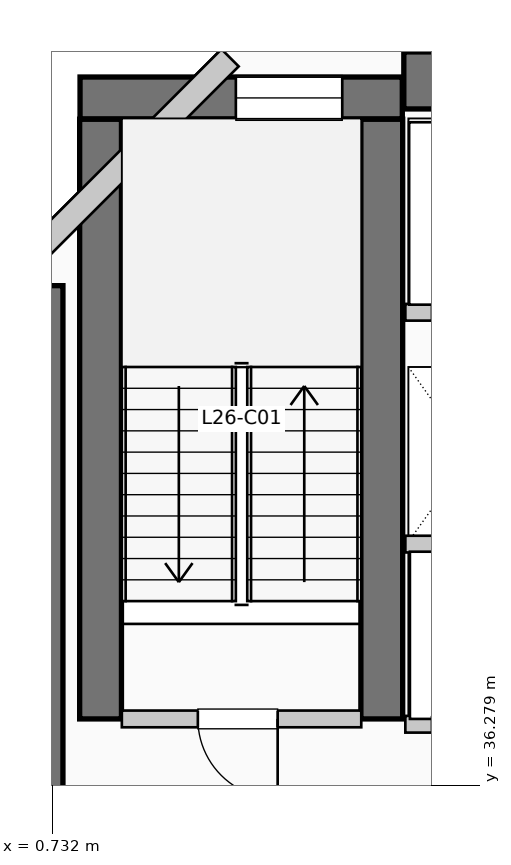
"""IFC4 building model, lengths in metres.
Left out: names, types, materials, properties, quantities, classifications, styles, units other than length and angle.
Written with IfcOpenShell. Run it as: python <this file> out.ifc"""

import sys

from ifc_helpers import new_model, si_unit, direction, frame, frame_2d, origin, place, context, subcontext, project, spatial, rectangle, extrude, element, fill, save


model = new_model("IFC4")
c1 = context("Model", 3, precision=1e-05, world=origin(), true_north=direction((0.0, 1.0)))
c2 = subcontext(c1, "Body", "Model", "MODEL_VIEW")
j1 = project(units=[si_unit("LENGTHUNIT", "METRE"), si_unit("PLANEANGLEUNIT", "RADIAN")], contexts=[c1])
p1 = place(None, origin())
s1 = spatial("IfcSite", under=j1, at=p1, CompositionType="ELEMENT")
p2 = place(p1, origin())
s2 = spatial("IfcBuilding", under=s1, at=p2, CompositionType="ELEMENT")
p3 = place(p2, frame((0.0, 0.0, 110.55)))
s3 = spatial("IfcBuildingStorey", under=s2, at=p3, CompositionType="ELEMENT", Elevation=110.55)
p4 = place(p3, frame((5.36, 45.55, 0.0), z_axis=(0.0, 0.0, 1.0), x_axis=(1.0, 0.0, 0.0)))
e1 = element("IfcWall", 1, at=p4, inside=s3, PredefinedType="SHEAR", context=c2, shape_type="SweptSolid", body=[
    extrude(rectangle(XDim=13.98, YDim=0.75, at=frame_2d((6.99, 0.0))), origin(), (0.0, 0.0, 1.0), 3.96),
])
p5 = place(p3, frame((0.5, 34.95, 0.0), z_axis=(0.0, 0.0, 1.0), x_axis=(0.0, 1.0, 0.0)))
e2 = element("IfcWall", 2, at=p5, inside=s3, PredefinedType="SHEAR", context=c2, shape_type="SweptSolid", body=[
    extrude(rectangle(XDim=7.9, YDim=0.75, at=frame_2d((3.95, 0.0))), origin(), (0.0, 0.0, 1.0), 3.96),
])
for number, where, z_axis, x_axis in (
    (3, (1.37, 37.15, 0.0), (0.0, 0.0, 1.0), (0.0, 1.0, 0.0)),
    (4, (5.07, 37.15, 0.0), (0.0, 0.0, 1.0), (0.0, 1.0, 0.0)),
):
    element("IfcWall", number, at=place(p3, frame(where, z_axis=z_axis, x_axis=x_axis)), inside=s3, PredefinedType="SHEAR", context=c2, shape_type="SweptSolid", body=[
        extrude(rectangle(XDim=7.89, YDim=0.55, at=frame_2d((3.945, 0.0))), origin(), (0.0, 0.0, 1.0), 3.96),
    ])
p6 = place(p3, frame((1.1, 45.32, 0.0), z_axis=(0.0, 0.0, 1.0), x_axis=(1.0, 0.0, 0.0)))
e5 = element("IfcWall", 5, at=p6, inside=s3, PredefinedType="SHEAR", context=c2, shape_type="SweptSolid", body=[
    extrude(rectangle(XDim=4.24, YDim=0.55, at=frame_2d((2.12, 0.0))), origin(), (0.0, 0.0, 1.0), 3.96),
])
p7 = place(p6, frame((2.05, 0.0, 1.05)))
e6 = element("IfcOpeningElement", 6, at=p7, cuts=e5, PredefinedType="OPENING", context=c2, shape_type="SweptSolid", body=[
    extrude(rectangle(XDim=1.4, YDim=1.8, at=frame_2d((0.7, 0.9))), frame((0.0, 0.285, 0.0), z_axis=(0.0, -1.0, 0.0), x_axis=(1.0, 0.0, 0.0)), (0.0, 0.0, 1.0), 0.57),
])
p8 = place(p3, frame((3.074, 45.848, 0.0), z_axis=(0.0, 0.0, 1.0), x_axis=(-0.707106781187, -0.707106781187, 0.0)))
e7 = element("IfcWall", 7, at=p8, inside=s3, PredefinedType="SOLIDWALL", context=c2, shape_type="SweptSolid", body=[
    extrude(rectangle(XDim=4.133, YDim=0.32, at=frame_2d((2.066, 0.0))), origin(), (0.0, 0.0, 1.0), 3.71),
])
p9 = place(p3, frame((1.65, 37.15, 0.0), z_axis=(0.0, 0.0, 1.0), x_axis=(1.0, 0.0, 0.0)))
e8 = element("IfcWall", 8, at=p9, inside=s3, PredefinedType="PARTITIONING", context=c2, shape_type="SweptSolid", body=[
    extrude(rectangle(XDim=3.15, YDim=0.22, at=frame_2d((1.575, 0.0))), origin(), (0.0, 0.0, 1.0), 3.71),
])
p10 = place(p9, frame((2.05, 0.0, 0.0), z_axis=(0.0, 0.0, 1.0), x_axis=(-1.0, 0.0, 0.0)))
e9 = element("IfcOpeningElement", 9, at=p10, cuts=e8, PredefinedType="OPENING", context=c2, shape_type="SweptSolid", body=[
    extrude(rectangle(XDim=1.05, YDim=2.15, at=frame_2d((0.525, 1.075))), frame((0.0, 0.12, 0.0), z_axis=(0.0, -1.0, 0.0), x_axis=(1.0, 0.0, 0.0)), (0.0, 0.0, 1.0), 0.24),
])
p11 = place(p3, frame((5.38, 37.08, 0.0), z_axis=(0.0, 0.0, 1.0), x_axis=(1.0, 0.0, 0.0)))
e10 = element("IfcWall", 10, at=p11, inside=s3, PredefinedType="PARTITIONING", context=c2, shape_type="SweptSolid", body=[
    extrude(rectangle(XDim=3.46, YDim=0.22, at=frame_2d((1.73, 0.0))), origin(), (0.0, 0.0, 1.0), 3.71),
])
p12 = place(p11, frame((1.55, 0.0, 0.0), z_axis=(0.0, 0.0, 1.0), x_axis=(-1.0, 0.0, 0.0)))
e11 = element("IfcOpeningElement", 11, at=p12, cuts=e10, PredefinedType="OPENING", context=c2, shape_type="SweptSolid", body=[
    extrude(rectangle(XDim=1.2, YDim=2.2, at=frame_2d((0.6, 1.1))), frame((0.0, 0.12, 0.0), z_axis=(0.0, -1.0, 0.0), x_axis=(1.0, 0.0, 0.0)), (0.0, 0.0, 1.0), 0.24),
])
p13 = place(p11, frame((3.22, 0.0, 0.0), z_axis=(0.0, 0.0, 1.0), x_axis=(-1.0, 0.0, 0.0)))
e12 = element("IfcOpeningElement", 12, at=p13, cuts=e10, PredefinedType="OPENING", context=c2, shape_type="SweptSolid", body=[
    extrude(rectangle(XDim=1.2, YDim=2.2, at=frame_2d((0.6, 1.1))), frame((0.0, 0.12, 0.0), z_axis=(0.0, -1.0, 0.0), x_axis=(1.0, 0.0, 0.0)), (0.0, 0.0, 1.0), 0.24),
])
p14 = place(p3, frame((5.38, 39.45, 0.0), z_axis=(0.0, 0.0, 1.0), x_axis=(1.0, 0.0, 0.0)))
e13 = element("IfcWall", 13, at=p14, inside=s3, PredefinedType="PARTITIONING", context=c2, shape_type="SweptSolid", body=[
    extrude(rectangle(XDim=3.46, YDim=0.22, at=frame_2d((1.73, 0.0))), origin(), (0.0, 0.0, 1.0), 3.71),
])
p15 = place(p3, frame((5.38, 42.5, 0.0), z_axis=(0.0, 0.0, 1.0), x_axis=(1.0, 0.0, 0.0)))
e14 = element("IfcWall", 14, at=p15, inside=s3, PredefinedType="PARTITIONING", context=c2, shape_type="SweptSolid", body=[
    extrude(rectangle(XDim=3.77, YDim=0.22, at=frame_2d((1.885, 0.0))), origin(), (0.0, 0.0, 1.0), 3.71),
])
p16 = place(p15, frame((1.75, 0.0, 0.0), z_axis=(0.0, 0.0, 1.0), x_axis=(-1.0, 0.0, 0.0)))
e15 = element("IfcOpeningElement", 15, at=p16, cuts=e14, PredefinedType="OPENING", context=c2, shape_type="SweptSolid", body=[
    extrude(rectangle(XDim=1.4, YDim=2.2, at=frame_2d((0.7, 1.1))), frame((0.0, 0.12, 0.0), z_axis=(0.0, -1.0, 0.0), x_axis=(1.0, 0.0, 0.0)), (0.0, 0.0, 1.0), 0.24),
])
p17 = place(p15, frame((3.53, 0.0, 0.0), z_axis=(0.0, 0.0, 1.0), x_axis=(-1.0, 0.0, 0.0)))
e16 = element("IfcOpeningElement", 16, at=p17, cuts=e14, PredefinedType="OPENING", context=c2, shape_type="SweptSolid", body=[
    extrude(rectangle(XDim=1.4, YDim=2.2, at=frame_2d((0.7, 1.1))), frame((0.0, 0.12, 0.0), z_axis=(0.0, -1.0, 0.0), x_axis=(1.0, 0.0, 0.0)), (0.0, 0.0, 1.0), 0.24),
])
p18 = place(p7, origin())
e17 = element("IfcWindow", 17, at=p18, inside=s3, PartitioningType="SINGLE_PANEL", PredefinedType="WINDOW", context=c2, shape_type="SweptSolid", body=[
    extrude(rectangle(XDim=1.4, YDim=1.8, at=frame_2d((0.7, 0.9))), frame((0.0, 0.03, 0.0), z_axis=(0.0, -1.0, 0.0), x_axis=(1.0, 0.0, 0.0)), (0.0, 0.0, 1.0), 0.06),
])
fill(e6, e17)
p19 = place(p10, origin())
e18 = element("IfcDoor", 18, at=p19, inside=s3, OperationType="SINGLE_SWING_RIGHT", PredefinedType="DOOR", context=c2, shape_type="SweptSolid", body=[
    extrude(rectangle(XDim=1.05, YDim=2.15, at=frame_2d((0.525, 1.075))), frame((0.0, 0.025, 0.0), z_axis=(0.0, -1.0, 0.0), x_axis=(1.0, 0.0, 0.0)), (0.0, 0.0, 1.0), 0.05),
])
fill(e9, e18)
save(model, sys.argv[1])
